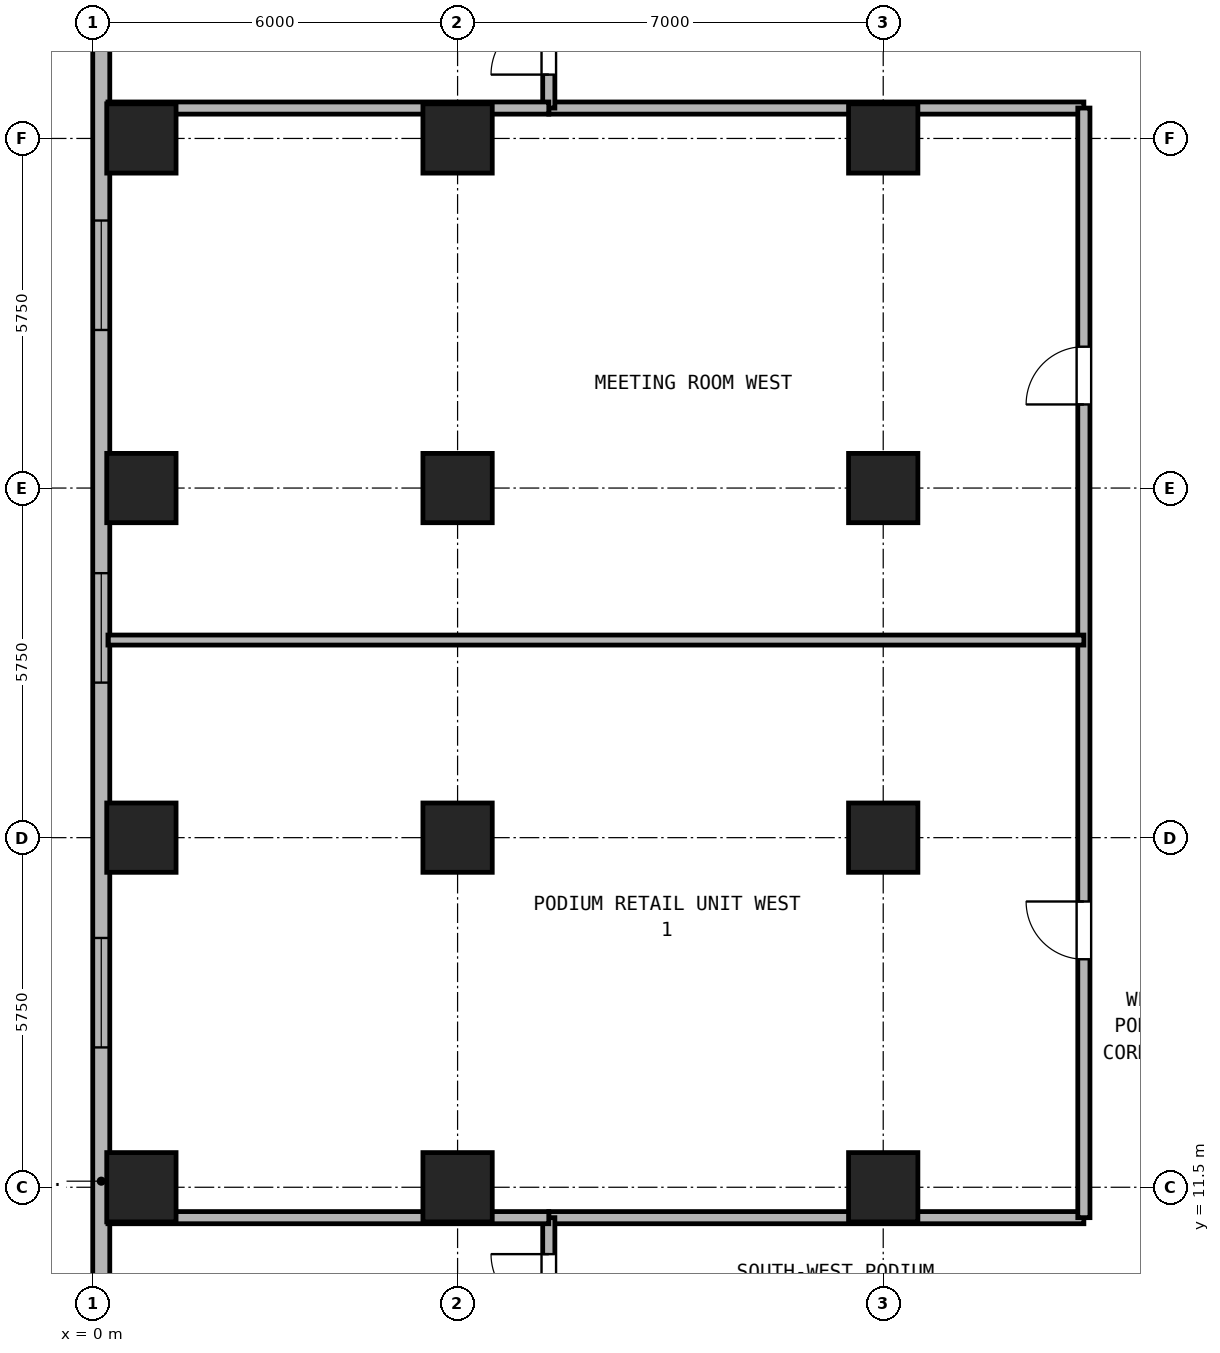
"""IFC4 building model, lengths in metres.
Left out: names, types, materials, properties, quantities, classifications, styles, units other than length and angle.
Written with IfcOpenShell. Run it as: python <this file> out.ifc"""

import sys

from ifc_helpers import new_model, si_unit, direction, frame, frame_2d, origin, origin_2d, place, context, subcontext, project, spatial, rectangle, hollow_rectangle, extrude, source, transform, mapped, element, fill, save


model = new_model("IFC4")
c1 = context("Model", 3, precision=1e-05, world=origin(), true_north=direction((0.0, 1.0)))
c2 = subcontext(c1, "Body", "Model", "MODEL_VIEW")
j1 = project(units=[si_unit("LENGTHUNIT", "METRE"), si_unit("PLANEANGLEUNIT", "RADIAN")], contexts=[c1])
p1 = place(None, origin())
s1 = spatial("IfcSite", under=j1, at=p1, CompositionType="ELEMENT")
p2 = place(p1, origin())
s2 = spatial("IfcBuilding", under=s1, at=p2, CompositionType="ELEMENT")
p3 = place(p2, frame((0.0, 0.0, 9.0)))
s3 = spatial("IfcBuildingStorey", under=s2, at=p3, CompositionType="ELEMENT", Elevation=9.0)
m1 = source(origin(), c2, "Body", "SweptSolid", [
    extrude(hollow_rectangle(XDim=1.14, YDim=1.14, WallThickness=0.07, at=origin_2d()), origin(), (0.0, 0.0, 1.0), 4.18),
])
for number, where, z_axis, x_axis in (
    (1, (0.8, 11.5, 0.0), (0.0, 0.0, 1.0), (1.0, 0.0, 0.0)),
    (2, (0.8, 17.25, 0.0), (0.0, 0.0, 1.0), (1.0, 0.0, 0.0)),
    (3, (0.8, 23.0, 0.0), (0.0, 0.0, 1.0), (1.0, 0.0, 0.0)),
    (4, (0.8, 28.75, 0.0), (0.0, 0.0, 1.0), (1.0, 0.0, 0.0)),
    (5, (6.0, 11.5, 0.0), (0.0, 0.0, 1.0), (1.0, 0.0, 0.0)),
    (6, (6.0, 17.25, 0.0), (0.0, 0.0, 1.0), (1.0, 0.0, 0.0)),
    (7, (6.0, 23.0, 0.0), (0.0, 0.0, 1.0), (1.0, 0.0, 0.0)),
    (8, (6.0, 28.75, 0.0), (0.0, 0.0, 1.0), (1.0, 0.0, 0.0)),
    (9, (13.0, 11.5, 0.0), (0.0, 0.0, 1.0), (1.0, 0.0, 0.0)),
    (10, (13.0, 17.25, 0.0), (0.0, 0.0, 1.0), (1.0, 0.0, 0.0)),
    (11, (13.0, 23.0, 0.0), (0.0, 0.0, 1.0), (1.0, 0.0, 0.0)),
    (12, (13.0, 28.75, 0.0), (0.0, 0.0, 1.0), (1.0, 0.0, 0.0)),
):
    element("IfcColumn", number, at=place(p3, frame(where, z_axis=z_axis, x_axis=x_axis)), inside=s3, PredefinedType="COLUMN", context=c2, shape_type="MappedRepresentation", body=[
        mapped(m1, transform((0.0, 0.0, 0.0), x_axis=(1.0, 0.0, 0.0), y_axis=(0.0, 1.0, 0.0), z_axis=(0.0, 0.0, 1.0), scale=1.0)),
    ])
p4 = place(p3, frame((0.14, 4.0, 0.0), z_axis=(0.0, 0.0, 1.0), x_axis=(0.0, 1.0, 0.0)))
e13 = element("IfcWall", 13, at=p4, inside=s3, PredefinedType="SOLIDWALL", context=c2, shape_type="SweptSolid", body=[
    extrude(rectangle(XDim=32.5, YDim=0.28, at=frame_2d((16.25, 0.0))), origin(), (0.0, 0.0, 1.0), 4.18),
])
p5 = place(p4, frame((3.6, 0.0, 0.9)))
e14 = element("IfcOpeningElement", 14, at=p5, cuts=e13, PredefinedType="OPENING", context=c2, shape_type="SweptSolid", body=[
    extrude(rectangle(XDim=1.8, YDim=2.1, at=frame_2d((0.9, 1.05))), frame((0.0, 0.15, 0.0), z_axis=(0.0, -1.0, 0.0), x_axis=(1.0, 0.0, 0.0)), (0.0, 0.0, 1.0), 0.3),
])
p6 = place(p4, frame((9.8, 0.0, 0.9)))
e15 = element("IfcOpeningElement", 15, at=p6, cuts=e13, PredefinedType="OPENING", context=c2, shape_type="SweptSolid", body=[
    extrude(rectangle(XDim=1.8, YDim=2.1, at=frame_2d((0.9, 1.05))), frame((0.0, 0.15, 0.0), z_axis=(0.0, -1.0, 0.0), x_axis=(1.0, 0.0, 0.0)), (0.0, 0.0, 1.0), 0.3),
])
p7 = place(p4, frame((15.8, 0.0, 0.9)))
e16 = element("IfcOpeningElement", 16, at=p7, cuts=e13, PredefinedType="OPENING", context=c2, shape_type="SweptSolid", body=[
    extrude(rectangle(XDim=1.8, YDim=2.1, at=frame_2d((0.9, 1.05))), frame((0.0, 0.15, 0.0), z_axis=(0.0, -1.0, 0.0), x_axis=(1.0, 0.0, 0.0)), (0.0, 0.0, 1.0), 0.3),
])
p8 = place(p4, frame((21.6, 0.0, 0.9)))
e17 = element("IfcOpeningElement", 17, at=p8, cuts=e13, PredefinedType="OPENING", context=c2, shape_type="SweptSolid", body=[
    extrude(rectangle(XDim=1.8, YDim=2.1, at=frame_2d((0.9, 1.05))), frame((0.0, 0.15, 0.0), z_axis=(0.0, -1.0, 0.0), x_axis=(1.0, 0.0, 0.0)), (0.0, 0.0, 1.0), 0.3),
])
p9 = place(p4, frame((27.6, 0.0, 0.9)))
e18 = element("IfcOpeningElement", 18, at=p9, cuts=e13, PredefinedType="OPENING", context=c2, shape_type="SweptSolid", body=[
    extrude(rectangle(XDim=1.8, YDim=2.1, at=frame_2d((0.9, 1.05))), frame((0.0, 0.15, 0.0), z_axis=(0.0, -1.0, 0.0), x_axis=(1.0, 0.0, 0.0)), (0.0, 0.0, 1.0), 0.3),
])
for number, where, z_axis, x_axis in (
    (19, (7.5, 11.0, 0.0), (0.0, 0.0, 1.0), (1.0, 0.0, 0.0)),
    (20, (7.5, 29.25, 0.0), (0.0, 0.0, 1.0), (1.0, 0.0, 0.0)),
):
    element("IfcWall", number, at=place(p3, frame(where, z_axis=z_axis, x_axis=x_axis)), inside=s3, PredefinedType="PARTITIONING", context=c2, shape_type="SweptSolid", body=[
        extrude(rectangle(XDim=8.8, YDim=0.2, at=frame_2d((4.4, 0.0))), origin(), (0.0, 0.0, 1.0), 4.18),
    ])
p10 = place(p3, frame((16.3, 11.0, 0.0), z_axis=(0.0, 0.0, 1.0), x_axis=(0.0, 1.0, 0.0)))
e21 = element("IfcWall", 21, at=p10, inside=s3, PredefinedType="PARTITIONING", context=c2, shape_type="SweptSolid", body=[
    extrude(rectangle(XDim=18.25, YDim=0.2, at=frame_2d((9.125, 0.0))), origin(), (0.0, 0.0, 1.0), 4.18),
])
p11 = place(p10, frame((4.25, 0.0, 0.0)))
e22 = element("IfcOpeningElement", 22, at=p11, cuts=e21, PredefinedType="OPENING", context=c2, shape_type="SweptSolid", body=[
    extrude(rectangle(XDim=0.95, YDim=2.15, at=frame_2d((0.475, 1.075))), frame((0.0, 0.11, 0.0), z_axis=(0.0, -1.0, 0.0), x_axis=(1.0, 0.0, 0.0)), (0.0, 0.0, 1.0), 0.22),
])
p12 = place(p10, frame((13.375, 0.0, 0.0)))
e23 = element("IfcOpeningElement", 23, at=p12, cuts=e21, PredefinedType="OPENING", context=c2, shape_type="SweptSolid", body=[
    extrude(rectangle(XDim=0.95, YDim=2.15, at=frame_2d((0.475, 1.075))), frame((0.0, 0.11, 0.0), z_axis=(0.0, -1.0, 0.0), x_axis=(1.0, 0.0, 0.0)), (0.0, 0.0, 1.0), 0.22),
])
p13 = place(p3, frame((7.5, 0.25, 0.0), z_axis=(0.0, 0.0, 1.0), x_axis=(0.0, 1.0, 0.0)))
e24 = element("IfcWall", 24, at=p13, inside=s3, PredefinedType="PARTITIONING", context=c2, shape_type="SweptSolid", body=[
    extrude(rectangle(XDim=10.75, YDim=0.2, at=frame_2d((5.375, 0.0))), origin(), (0.0, 0.0, 1.0), 4.18),
])
p14 = place(p13, frame((9.2, 0.0, 0.0)))
e25 = element("IfcOpeningElement", 25, at=p14, cuts=e24, PredefinedType="OPENING", context=c2, shape_type="SweptSolid", body=[
    extrude(rectangle(XDim=0.95, YDim=2.15, at=frame_2d((0.475, 1.075))), frame((0.0, 0.11, 0.0), z_axis=(0.0, -1.0, 0.0), x_axis=(1.0, 0.0, 0.0)), (0.0, 0.0, 1.0), 0.22),
])
p15 = place(p3, frame((7.5, 29.25, 0.0), z_axis=(0.0, 0.0, 1.0), x_axis=(0.0, 1.0, 0.0)))
e26 = element("IfcWall", 26, at=p15, inside=s3, PredefinedType="PARTITIONING", context=c2, shape_type="SweptSolid", body=[
    extrude(rectangle(XDim=11.0, YDim=0.2, at=frame_2d((5.5, 0.0))), origin(), (0.0, 0.0, 1.0), 4.18),
])
p16 = place(p15, frame((0.55, 0.0, 0.0)))
e27 = element("IfcOpeningElement", 27, at=p16, cuts=e26, PredefinedType="OPENING", context=c2, shape_type="SweptSolid", body=[
    extrude(rectangle(XDim=0.95, YDim=2.15, at=frame_2d((0.475, 1.075))), frame((0.0, 0.11, 0.0), z_axis=(0.0, -1.0, 0.0), x_axis=(1.0, 0.0, 0.0)), (0.0, 0.0, 1.0), 0.22),
])
for number, where, z_axis, x_axis in (
    (28, (0.25, 11.0, 0.0), (0.0, 0.0, 1.0), (1.0, 0.0, 0.0)),
    (29, (0.25, 29.25, 0.0), (0.0, 0.0, 1.0), (1.0, 0.0, 0.0)),
):
    element("IfcWall", number, at=place(p3, frame(where, z_axis=z_axis, x_axis=x_axis)), inside=s3, PredefinedType="PARTITIONING", context=c2, shape_type="SweptSolid", body=[
        extrude(rectangle(XDim=7.25, YDim=0.2, at=frame_2d((3.625, 0.0))), origin(), (0.0, 0.0, 1.0), 4.18),
    ])
p17 = place(p3, frame((0.25, 20.5, 0.0), z_axis=(0.0, 0.0, 1.0), x_axis=(1.0, 0.0, 0.0)))
e30 = element("IfcWall", 30, at=p17, inside=s3, PredefinedType="PARTITIONING", context=c2, shape_type="SweptSolid", body=[
    extrude(rectangle(XDim=16.05, YDim=0.165, at=frame_2d((8.025, 0.0))), origin(), (0.0, 0.0, 1.0), 4.18),
])
p18 = place(p6, origin())
e31 = element("IfcWindow", 31, at=p18, inside=s3, PartitioningType="SINGLE_PANEL", PredefinedType="WINDOW", context=c2, shape_type="SweptSolid", body=[
    extrude(rectangle(XDim=1.8, YDim=2.1, at=frame_2d((0.9, 1.05))), frame((0.0, 0.03, 0.0), z_axis=(0.0, -1.0, 0.0), x_axis=(1.0, 0.0, 0.0)), (0.0, 0.0, 1.0), 0.06),
])
fill(e15, e31)
p19 = place(p7, origin())
e32 = element("IfcWindow", 32, at=p19, inside=s3, PartitioningType="SINGLE_PANEL", PredefinedType="WINDOW", context=c2, shape_type="SweptSolid", body=[
    extrude(rectangle(XDim=1.8, YDim=2.1, at=frame_2d((0.9, 1.05))), frame((0.0, 0.03, 0.0), z_axis=(0.0, -1.0, 0.0), x_axis=(1.0, 0.0, 0.0)), (0.0, 0.0, 1.0), 0.06),
])
fill(e16, e32)
p20 = place(p8, origin())
e33 = element("IfcWindow", 33, at=p20, inside=s3, PartitioningType="SINGLE_PANEL", PredefinedType="WINDOW", context=c2, shape_type="SweptSolid", body=[
    extrude(rectangle(XDim=1.8, YDim=2.1, at=frame_2d((0.9, 1.05))), frame((0.0, 0.03, 0.0), z_axis=(0.0, -1.0, 0.0), x_axis=(1.0, 0.0, 0.0)), (0.0, 0.0, 1.0), 0.06),
])
fill(e17, e33)
p21 = place(p14, frame((0.95, 0.0, 0.0), z_axis=(0.0, 0.0, 1.0), x_axis=(-1.0, 0.0, 0.0)))
e34 = element("IfcDoor", 34, at=p21, inside=s3, OperationType="SINGLE_SWING_RIGHT", PredefinedType="DOOR", context=c2, shape_type="SweptSolid", body=[
    extrude(rectangle(XDim=0.95, YDim=2.15, at=frame_2d((0.475, 1.075))), frame((0.0, 0.025, 0.0), z_axis=(0.0, -1.0, 0.0), x_axis=(1.0, 0.0, 0.0)), (0.0, 0.0, 1.0), 0.05),
])
fill(e25, e34)
p22 = place(p16, frame((0.95, 0.0, 0.0), z_axis=(0.0, 0.0, 1.0), x_axis=(-1.0, 0.0, 0.0)))
e35 = element("IfcDoor", 35, at=p22, inside=s3, OperationType="SINGLE_SWING_LEFT", PredefinedType="DOOR", context=c2, shape_type="SweptSolid", body=[
    extrude(rectangle(XDim=0.95, YDim=2.15, at=frame_2d((0.475, 1.075))), frame((0.0, 0.025, 0.0), z_axis=(0.0, -1.0, 0.0), x_axis=(1.0, 0.0, 0.0)), (0.0, 0.0, 1.0), 0.05),
])
fill(e27, e35)
p23 = place(p11, frame((0.95, 0.0, 0.0), z_axis=(0.0, 0.0, 1.0), x_axis=(-1.0, 0.0, 0.0)))
e36 = element("IfcDoor", 36, at=p23, inside=s3, OperationType="SINGLE_SWING_RIGHT", PredefinedType="DOOR", context=c2, shape_type="SweptSolid", body=[
    extrude(rectangle(XDim=0.95, YDim=2.15, at=frame_2d((0.475, 1.075))), frame((0.0, 0.025, 0.0), z_axis=(0.0, -1.0, 0.0), x_axis=(1.0, 0.0, 0.0)), (0.0, 0.0, 1.0), 0.05),
])
fill(e22, e36)
p24 = place(p12, frame((0.95, 0.0, 0.0), z_axis=(0.0, 0.0, 1.0), x_axis=(-1.0, 0.0, 0.0)))
e37 = element("IfcDoor", 37, at=p24, inside=s3, OperationType="SINGLE_SWING_LEFT", PredefinedType="DOOR", context=c2, shape_type="SweptSolid", body=[
    extrude(rectangle(XDim=0.95, YDim=2.15, at=frame_2d((0.475, 1.075))), frame((0.0, 0.025, 0.0), z_axis=(0.0, -1.0, 0.0), x_axis=(1.0, 0.0, 0.0)), (0.0, 0.0, 1.0), 0.05),
])
fill(e23, e37)
save(model, sys.argv[1])
